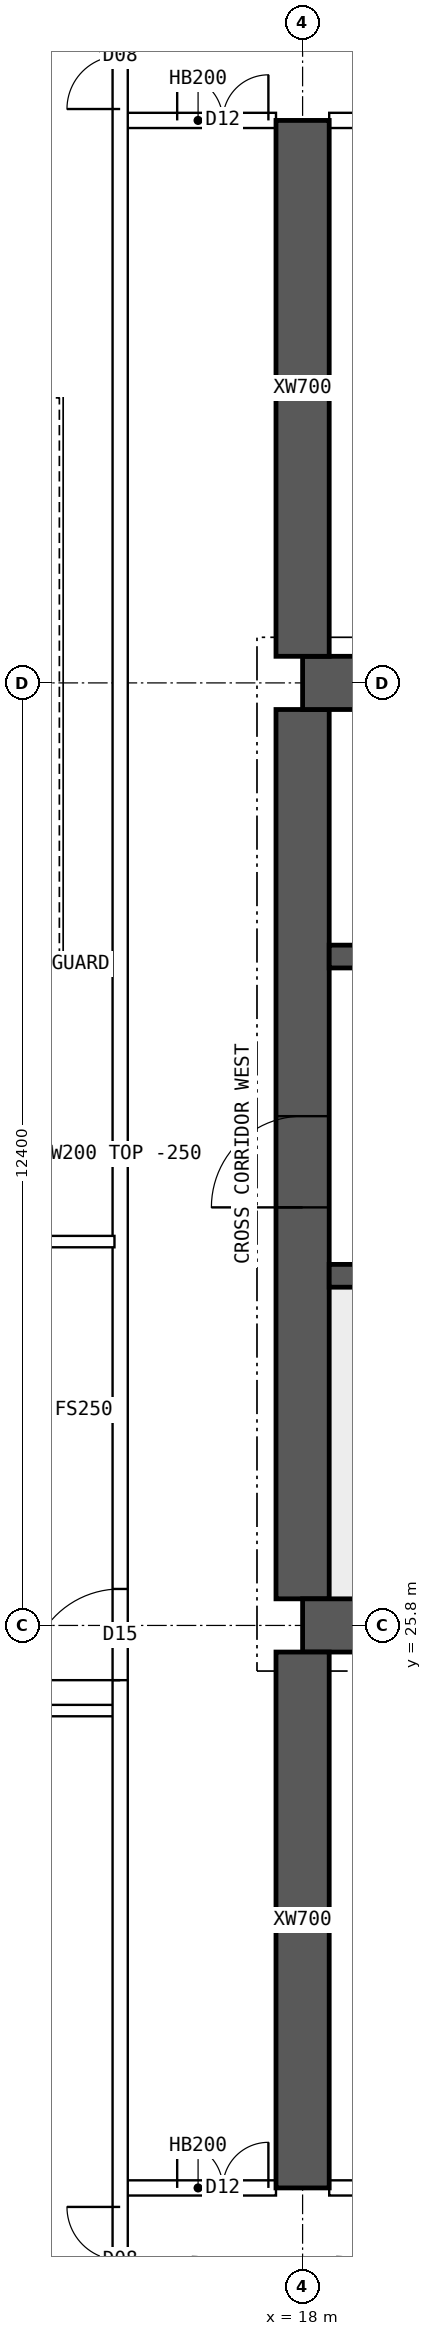
"""IFC4 building model, lengths in metres.
Left out: names, types, materials, properties, quantities, classifications, styles, units other than length and angle.
Written with IfcOpenShell. Run it as: python <this file> out.ifc"""

import sys

from ifc_helpers import new_model, si_unit, direction, frame, frame_2d, origin, place, context, subcontext, project, spatial, polyline, rectangle, outline, extrude, element, fill, save


model = new_model("IFC4")
c1 = context("Model", 3, precision=1e-05, world=origin(), true_north=direction((0.0, 1.0)))
c2 = subcontext(c1, "Body", "Model", "MODEL_VIEW")
j1 = project(units=[si_unit("LENGTHUNIT", "METRE"), si_unit("PLANEANGLEUNIT", "RADIAN")], contexts=[c1])
p1 = place(None, origin())
s1 = spatial("IfcSite", under=j1, at=p1, CompositionType="ELEMENT")
p2 = place(p1, origin())
s2 = spatial("IfcBuilding", under=s1, at=p2, CompositionType="ELEMENT")
p3 = place(p2, frame((0.0, 0.0, 220.3)))
s3 = spatial("IfcBuildingStorey", under=s2, at=p3, CompositionType="ELEMENT", Elevation=220.3)
for number, where, z_axis, x_axis in (
    (1, (18.0, 25.8, 0.0), (0.0, 0.0, 1.0), (1.0, 0.0, 0.0)),
    (2, (18.0, 38.2, 0.0), (0.0, 0.0, 1.0), (1.0, 0.0, 0.0)),
):
    element("IfcWall", number, at=place(p3, frame(where, z_axis=z_axis, x_axis=x_axis)), inside=s3, PredefinedType="SHEAR", context=c2, shape_type="SweptSolid", body=[
        extrude(rectangle(XDim=48.0, YDim=0.7, at=frame_2d((24.0, 0.0))), origin(), (0.0, 0.0, 1.0), 3.75),
    ])
p4 = place(p3, frame((18.0, 26.15, 0.0), z_axis=(0.0, 0.0, 1.0), x_axis=(0.0, 1.0, 0.0)))
e3 = element("IfcWall", 3, at=p4, inside=s3, PredefinedType="SHEAR", context=c2, shape_type="SweptSolid", body=[
    extrude(rectangle(XDim=11.7, YDim=0.7, at=frame_2d((5.85, 0.0))), origin(), (0.0, 0.0, 1.0), 3.75),
])
p5 = place(p4, frame((5.15, 0.0, 0.0)))
e4 = element("IfcOpeningElement", 4, at=p5, cuts=e3, PredefinedType="OPENING", context=c2, shape_type="SweptSolid", body=[
    extrude(rectangle(XDim=1.2, YDim=2.1, at=frame_2d((0.6, 1.05))), frame((0.0, 0.36, 0.0), z_axis=(0.0, -1.0, 0.0), x_axis=(1.0, 0.0, 0.0)), (0.0, 0.0, 1.0), 0.72),
])
p6 = place(p3, frame((18.35, 30.4, 0.0), z_axis=(0.0, 0.0, 1.0), x_axis=(1.0, 0.0, 0.0)))
e5 = element("IfcWall", 5, at=p6, inside=s3, PredefinedType="SHEAR", context=c2, shape_type="SweptSolid", body=[
    extrude(rectangle(XDim=47.3, YDim=0.3, at=frame_2d((23.65, 0.0))), origin(), (0.0, 0.0, 1.0), 3.75),
])
p7 = place(p6, frame((0.4, 0.0, 0.0)))
e6 = element("IfcOpeningElement", 6, at=p7, cuts=e5, PredefinedType="OPENING", context=c2, shape_type="SweptSolid", body=[
    extrude(rectangle(XDim=1.0, YDim=2.1, at=frame_2d((0.5, 1.05))), frame((0.0, 0.16, 0.0), z_axis=(0.0, -1.0, 0.0), x_axis=(1.0, 0.0, 0.0)), (0.0, 0.0, 1.0), 0.32),
])
p8 = place(p6, frame((45.9, 0.0, 0.0)))
e7 = element("IfcOpeningElement", 7, at=p8, cuts=e5, PredefinedType="OPENING", context=c2, shape_type="SweptSolid", body=[
    extrude(rectangle(XDim=1.0, YDim=2.1, at=frame_2d((0.5, 1.05))), frame((0.0, 0.16, 0.0), z_axis=(0.0, -1.0, 0.0), x_axis=(1.0, 0.0, 0.0)), (0.0, 0.0, 1.0), 0.32),
])
p9 = place(p6, frame((8.4, 0.0, 0.0)))
e8 = element("IfcOpeningElement", 8, at=p9, cuts=e5, PredefinedType="OPENING", context=c2, shape_type="SweptSolid", body=[
    extrude(rectangle(XDim=1.1, YDim=2.1, at=frame_2d((0.55, 1.05))), frame((0.0, 0.16, 0.0), z_axis=(0.0, -1.0, 0.0), x_axis=(1.0, 0.0, 0.0)), (0.0, 0.0, 1.0), 0.32),
])
p10 = place(p6, frame((11.0, 0.0, 0.0)))
e9 = element("IfcOpeningElement", 9, at=p10, cuts=e5, PredefinedType="OPENING", context=c2, shape_type="SweptSolid", body=[
    extrude(rectangle(XDim=1.1, YDim=2.1, at=frame_2d((0.55, 1.05))), frame((0.0, 0.16, 0.0), z_axis=(0.0, -1.0, 0.0), x_axis=(1.0, 0.0, 0.0)), (0.0, 0.0, 1.0), 0.32),
])
p11 = place(p6, frame((13.6, 0.0, 0.0)))
e10 = element("IfcOpeningElement", 10, at=p11, cuts=e5, PredefinedType="OPENING", context=c2, shape_type="SweptSolid", body=[
    extrude(rectangle(XDim=1.1, YDim=2.1, at=frame_2d((0.55, 1.05))), frame((0.0, 0.16, 0.0), z_axis=(0.0, -1.0, 0.0), x_axis=(1.0, 0.0, 0.0)), (0.0, 0.0, 1.0), 0.32),
])
p12 = place(p6, frame((16.2, 0.0, 0.0)))
e11 = element("IfcOpeningElement", 11, at=p12, cuts=e5, PredefinedType="OPENING", context=c2, shape_type="SweptSolid", body=[
    extrude(rectangle(XDim=1.1, YDim=2.1, at=frame_2d((0.55, 1.05))), frame((0.0, 0.16, 0.0), z_axis=(0.0, -1.0, 0.0), x_axis=(1.0, 0.0, 0.0)), (0.0, 0.0, 1.0), 0.32),
])
p13 = place(p6, frame((18.975, 0.0, 0.0)))
e12 = element("IfcOpeningElement", 12, at=p13, cuts=e5, PredefinedType="OPENING", context=c2, shape_type="SweptSolid", body=[
    extrude(rectangle(XDim=0.9, YDim=2.1, at=frame_2d((0.45, 1.05))), frame((0.0, 0.16, 0.0), z_axis=(0.0, -1.0, 0.0), x_axis=(1.0, 0.0, 0.0)), (0.0, 0.0, 1.0), 0.32),
])
p14 = place(p6, frame((24.475, 0.0, 0.0)))
e13 = element("IfcOpeningElement", 13, at=p14, cuts=e5, PredefinedType="OPENING", context=c2, shape_type="SweptSolid", body=[
    extrude(rectangle(XDim=0.9, YDim=2.1, at=frame_2d((0.45, 1.05))), frame((0.0, 0.16, 0.0), z_axis=(0.0, -1.0, 0.0), x_axis=(1.0, 0.0, 0.0)), (0.0, 0.0, 1.0), 0.32),
])
p15 = place(p6, frame((30.267, 0.0, 0.0)))
e14 = element("IfcOpeningElement", 14, at=p15, cuts=e5, PredefinedType="OPENING", context=c2, shape_type="SweptSolid", body=[
    extrude(rectangle(XDim=1.1, YDim=2.1, at=frame_2d((0.55, 1.05))), frame((0.0, 0.16, 0.0), z_axis=(0.0, -1.0, 0.0), x_axis=(1.0, 0.0, 0.0)), (0.0, 0.0, 1.0), 0.32),
])
p16 = place(p6, frame((33.8, 0.0, 0.0)))
e15 = element("IfcOpeningElement", 15, at=p16, cuts=e5, PredefinedType="OPENING", context=c2, shape_type="SweptSolid", body=[
    extrude(rectangle(XDim=1.1, YDim=2.1, at=frame_2d((0.55, 1.05))), frame((0.0, 0.16, 0.0), z_axis=(0.0, -1.0, 0.0), x_axis=(1.0, 0.0, 0.0)), (0.0, 0.0, 1.0), 0.32),
])
p17 = place(p6, frame((37.333, 0.0, 0.0)))
e16 = element("IfcOpeningElement", 16, at=p17, cuts=e5, PredefinedType="OPENING", context=c2, shape_type="SweptSolid", body=[
    extrude(rectangle(XDim=1.1, YDim=2.1, at=frame_2d((0.55, 1.05))), frame((0.0, 0.16, 0.0), z_axis=(0.0, -1.0, 0.0), x_axis=(1.0, 0.0, 0.0)), (0.0, 0.0, 1.0), 0.32),
])
p18 = place(p3, frame((18.35, 34.6, 0.0), z_axis=(0.0, 0.0, 1.0), x_axis=(1.0, 0.0, 0.0)))
e17 = element("IfcWall", 17, at=p18, inside=s3, PredefinedType="SHEAR", context=c2, shape_type="SweptSolid", body=[
    extrude(rectangle(XDim=47.3, YDim=0.3, at=frame_2d((23.65, 0.0))), origin(), (0.0, 0.0, 1.0), 3.75),
])
p19 = place(p18, frame((0.9, 0.0, 0.0)))
e18 = element("IfcOpeningElement", 18, at=p19, cuts=e17, PredefinedType="OPENING", context=c2, shape_type="SweptSolid", body=[
    extrude(rectangle(XDim=1.1, YDim=2.1, at=frame_2d((0.55, 1.05))), frame((0.0, 0.16, 0.0), z_axis=(0.0, -1.0, 0.0), x_axis=(1.0, 0.0, 0.0)), (0.0, 0.0, 1.0), 0.32),
])
p20 = place(p18, frame((45.3, 0.0, 0.0)))
e19 = element("IfcOpeningElement", 19, at=p20, cuts=e17, PredefinedType="OPENING", context=c2, shape_type="SweptSolid", body=[
    extrude(rectangle(XDim=1.1, YDim=2.1, at=frame_2d((0.55, 1.05))), frame((0.0, 0.16, 0.0), z_axis=(0.0, -1.0, 0.0), x_axis=(1.0, 0.0, 0.0)), (0.0, 0.0, 1.0), 0.32),
])
p21 = place(p18, frame((4.25, 0.0, 0.0)))
e20 = element("IfcOpeningElement", 20, at=p21, cuts=e17, PredefinedType="OPENING", context=c2, shape_type="SweptSolid", body=[
    extrude(rectangle(XDim=0.9, YDim=2.1, at=frame_2d((0.45, 1.05))), frame((0.0, 0.16, 0.0), z_axis=(0.0, -1.0, 0.0), x_axis=(1.0, 0.0, 0.0)), (0.0, 0.0, 1.0), 0.32),
])
p22 = place(p18, frame((42.15, 0.0, 0.0)))
e21 = element("IfcOpeningElement", 21, at=p22, cuts=e17, PredefinedType="OPENING", context=c2, shape_type="SweptSolid", body=[
    extrude(rectangle(XDim=0.9, YDim=2.1, at=frame_2d((0.45, 1.05))), frame((0.0, 0.16, 0.0), z_axis=(0.0, -1.0, 0.0), x_axis=(1.0, 0.0, 0.0)), (0.0, 0.0, 1.0), 0.32),
])
p23 = place(p18, frame((9.025, 0.0, 0.0)))
e22 = element("IfcOpeningElement", 22, at=p23, cuts=e17, PredefinedType="OPENING", context=c2, shape_type="SweptSolid", body=[
    extrude(rectangle(XDim=0.9, YDim=2.1, at=frame_2d((0.45, 1.05))), frame((0.0, 0.16, 0.0), z_axis=(0.0, -1.0, 0.0), x_axis=(1.0, 0.0, 0.0)), (0.0, 0.0, 1.0), 0.32),
])
p24 = place(p18, frame((12.999, 0.0, 0.0)))
e23 = element("IfcOpeningElement", 23, at=p24, cuts=e17, PredefinedType="OPENING", context=c2, shape_type="SweptSolid", body=[
    extrude(rectangle(XDim=0.9, YDim=2.1, at=frame_2d((0.45, 1.05))), frame((0.0, 0.16, 0.0), z_axis=(0.0, -1.0, 0.0), x_axis=(1.0, 0.0, 0.0)), (0.0, 0.0, 1.0), 0.32),
])
p25 = place(p18, frame((16.646, 0.0, 0.0)))
e24 = element("IfcOpeningElement", 24, at=p25, cuts=e17, PredefinedType="OPENING", context=c2, shape_type="SweptSolid", body=[
    extrude(rectangle(XDim=0.9, YDim=2.1, at=frame_2d((0.45, 1.05))), frame((0.0, 0.16, 0.0), z_axis=(0.0, -1.0, 0.0), x_axis=(1.0, 0.0, 0.0)), (0.0, 0.0, 1.0), 0.32),
])
p26 = place(p18, frame((20.405, 0.0, 0.0)))
e25 = element("IfcOpeningElement", 25, at=p26, cuts=e17, PredefinedType="OPENING", context=c2, shape_type="SweptSolid", body=[
    extrude(rectangle(XDim=0.9, YDim=2.1, at=frame_2d((0.45, 1.05))), frame((0.0, 0.16, 0.0), z_axis=(0.0, -1.0, 0.0), x_axis=(1.0, 0.0, 0.0)), (0.0, 0.0, 1.0), 0.32),
])
p27 = place(p18, frame((24.811, 0.0, 0.0)))
e26 = element("IfcOpeningElement", 26, at=p27, cuts=e17, PredefinedType="OPENING", context=c2, shape_type="SweptSolid", body=[
    extrude(rectangle(XDim=0.9, YDim=2.1, at=frame_2d((0.45, 1.05))), frame((0.0, 0.16, 0.0), z_axis=(0.0, -1.0, 0.0), x_axis=(1.0, 0.0, 0.0)), (0.0, 0.0, 1.0), 0.32),
])
p28 = place(p18, frame((27.608, 0.0, 0.0)))
e27 = element("IfcOpeningElement", 27, at=p28, cuts=e17, PredefinedType="OPENING", context=c2, shape_type="SweptSolid", body=[
    extrude(rectangle(XDim=0.9, YDim=2.1, at=frame_2d((0.45, 1.05))), frame((0.0, 0.16, 0.0), z_axis=(0.0, -1.0, 0.0), x_axis=(1.0, 0.0, 0.0)), (0.0, 0.0, 1.0), 0.32),
])
p29 = place(p18, frame((29.575, 0.0, 0.0)))
e28 = element("IfcOpeningElement", 28, at=p29, cuts=e17, PredefinedType="OPENING", context=c2, shape_type="SweptSolid", body=[
    extrude(rectangle(XDim=0.9, YDim=2.1, at=frame_2d((0.45, 1.05))), frame((0.0, 0.16, 0.0), z_axis=(0.0, -1.0, 0.0), x_axis=(1.0, 0.0, 0.0)), (0.0, 0.0, 1.0), 0.32),
])
p30 = place(p18, frame((32.007, 0.0, 0.0)))
e29 = element("IfcOpeningElement", 29, at=p30, cuts=e17, PredefinedType="OPENING", context=c2, shape_type="SweptSolid", body=[
    extrude(rectangle(XDim=0.9, YDim=2.1, at=frame_2d((0.45, 1.05))), frame((0.0, 0.16, 0.0), z_axis=(0.0, -1.0, 0.0), x_axis=(1.0, 0.0, 0.0)), (0.0, 0.0, 1.0), 0.32),
])
p31 = place(p18, frame((34.742, 0.0, 0.0)))
e30 = element("IfcOpeningElement", 30, at=p31, cuts=e17, PredefinedType="OPENING", context=c2, shape_type="SweptSolid", body=[
    extrude(rectangle(XDim=0.9, YDim=2.1, at=frame_2d((0.45, 1.05))), frame((0.0, 0.16, 0.0), z_axis=(0.0, -1.0, 0.0), x_axis=(1.0, 0.0, 0.0)), (0.0, 0.0, 1.0), 0.32),
])
p32 = place(p18, frame((37.781, 0.0, 0.0)))
e31 = element("IfcOpeningElement", 31, at=p32, cuts=e17, PredefinedType="OPENING", context=c2, shape_type="SweptSolid", body=[
    extrude(rectangle(XDim=0.9, YDim=2.1, at=frame_2d((0.45, 1.05))), frame((0.0, 0.16, 0.0), z_axis=(0.0, -1.0, 0.0), x_axis=(1.0, 0.0, 0.0)), (0.0, 0.0, 1.0), 0.32),
])
for number, where, z_axis, x_axis in (
    (32, (18.0, 18.4, 0.0), (0.0, 0.0, 1.0), (0.0, 1.0, 0.0)),
    (33, (18.0, 38.55, 0.0), (0.0, 0.0, 1.0), (0.0, 1.0, 0.0)),
):
    element("IfcWall", number, at=place(p3, frame(where, z_axis=z_axis, x_axis=x_axis)), inside=s3, PredefinedType="SHEAR", context=c2, shape_type="SweptSolid", body=[
        extrude(rectangle(XDim=7.05, YDim=0.7, at=frame_2d((3.525, 0.0))), origin(), (0.0, 0.0, 1.0), 3.75),
    ])
p33 = place(p3, frame((15.6, 18.4, 0.0), z_axis=(0.0, 0.0, 1.0), x_axis=(1.0, 0.0, 0.0)))
e34 = element("IfcWall", 34, at=p33, inside=s3, PredefinedType="SOLIDWALL", context=c2, shape_type="SweptSolid", body=[
    extrude(rectangle(XDim=2.05, YDim=0.2, at=frame_2d((1.025, 0.0))), origin(), (0.0, 0.0, 1.0), 3.5),
])
p34 = place(p33, frame((0.75, 0.0, 0.0)))
e35 = element("IfcOpeningElement", 35, at=p34, cuts=e34, PredefinedType="OPENING", context=c2, shape_type="SweptSolid", body=[
    extrude(rectangle(XDim=1.2, YDim=2.1, at=frame_2d((0.6, 1.05))), frame((0.0, 0.11, 0.0), z_axis=(0.0, -1.0, 0.0), x_axis=(1.0, 0.0, 0.0)), (0.0, 0.0, 1.0), 0.22),
])
p35 = place(p3, frame((18.35, 18.4, 0.0), z_axis=(0.0, 0.0, 1.0), x_axis=(1.0, 0.0, 0.0)))
e36 = element("IfcWall", 36, at=p35, inside=s3, PredefinedType="SOLIDWALL", context=c2, shape_type="SweptSolid", body=[
    extrude(rectangle(XDim=5.3, YDim=0.2, at=frame_2d((2.65, 0.0))), origin(), (0.0, 0.0, 1.0), 3.5),
])
p36 = place(p35, frame((0.35, 0.0, 0.0)))
e37 = element("IfcOpeningElement", 37, at=p36, cuts=e36, PredefinedType="OPENING", context=c2, shape_type="SweptSolid", body=[
    extrude(rectangle(XDim=0.9, YDim=2.1, at=frame_2d((0.45, 1.05))), frame((0.0, 0.11, 0.0), z_axis=(0.0, -1.0, 0.0), x_axis=(1.0, 0.0, 0.0)), (0.0, 0.0, 1.0), 0.22),
])
p37 = place(p35, frame((3.165, 0.0, 0.0)))
e38 = element("IfcOpeningElement", 38, at=p37, cuts=e36, PredefinedType="OPENING", context=c2, shape_type="SweptSolid", body=[
    extrude(rectangle(XDim=0.9, YDim=2.1, at=frame_2d((0.45, 1.05))), frame((0.0, 0.11, 0.0), z_axis=(0.0, -1.0, 0.0), x_axis=(1.0, 0.0, 0.0)), (0.0, 0.0, 1.0), 0.22),
])
p38 = place(p3, frame((15.6, 45.6, 0.0), z_axis=(0.0, 0.0, 1.0), x_axis=(1.0, 0.0, 0.0)))
e39 = element("IfcWall", 39, at=p38, inside=s3, PredefinedType="SOLIDWALL", context=c2, shape_type="SweptSolid", body=[
    extrude(rectangle(XDim=2.05, YDim=0.2, at=frame_2d((1.025, 0.0))), origin(), (0.0, 0.0, 1.0), 3.5),
])
p39 = place(p38, frame((0.75, 0.0, 0.0)))
e40 = element("IfcOpeningElement", 40, at=p39, cuts=e39, PredefinedType="OPENING", context=c2, shape_type="SweptSolid", body=[
    extrude(rectangle(XDim=1.2, YDim=2.1, at=frame_2d((0.6, 1.05))), frame((0.0, 0.11, 0.0), z_axis=(0.0, -1.0, 0.0), x_axis=(1.0, 0.0, 0.0)), (0.0, 0.0, 1.0), 0.22),
])
p40 = place(p3, frame((18.35, 45.6, 0.0), z_axis=(0.0, 0.0, 1.0), x_axis=(1.0, 0.0, 0.0)))
e41 = element("IfcWall", 41, at=p40, inside=s3, PredefinedType="SOLIDWALL", context=c2, shape_type="SweptSolid", body=[
    extrude(rectangle(XDim=5.3, YDim=0.2, at=frame_2d((2.65, 0.0))), origin(), (0.0, 0.0, 1.0), 3.5),
])
p41 = place(p40, frame((0.8, 0.0, 0.0)))
e42 = element("IfcOpeningElement", 42, at=p41, cuts=e41, PredefinedType="OPENING", context=c2, shape_type="SweptSolid", body=[
    extrude(rectangle(XDim=1.0, YDim=2.1, at=frame_2d((0.5, 1.05))), frame((0.0, 0.11, 0.0), z_axis=(0.0, -1.0, 0.0), x_axis=(1.0, 0.0, 0.0)), (0.0, 0.0, 1.0), 0.22),
])
p42 = place(p3, frame((8.705, 30.85, 0.0), z_axis=(0.0, 0.0, 1.0), x_axis=(1.0, 0.0, 0.0)))
e43 = element("IfcWall", 43, at=p42, inside=s3, PredefinedType="PARTITIONING", context=c2, shape_type="SweptSolid", body=[
    extrude(outline(polyline([(0.0, 0.0), (6.82, 0.0), (6.82, 3.5), (3.597, 3.5), (3.595, 3.05), (2.997, 3.05), (2.995, 3.5), (0.0, 3.5), (0.0, 0.0)])), frame((0.0, 0.075, 0.0), z_axis=(0.0, -1.0, 0.0), x_axis=(1.0, 0.0, 0.0)), (0.0, 0.0, 1.0), 0.15),
])
p43 = place(p3, frame((15.6, 11.646, 0.0), z_axis=(0.0, 0.0, 1.0), x_axis=(0.0, 1.0, 0.0)))
e44 = element("IfcWall", 44, at=p43, inside=s3, PredefinedType="SOLIDWALL", context=c2, shape_type="SweptSolid", body=[
    extrude(rectangle(XDim=40.708, YDim=0.2, at=frame_2d((20.354, 0.0))), origin(), (0.0, 0.0, 1.0), 3.5),
])
p44 = place(p43, frame((13.434, 0.0, 0.0)))
e45 = element("IfcOpeningElement", 45, at=p44, cuts=e44, PredefinedType="OPENING", context=c2, shape_type="SweptSolid", body=[
    extrude(rectangle(XDim=1.2, YDim=2.1, at=frame_2d((0.6, 1.05))), frame((0.0, 0.11, 0.0), z_axis=(0.0, -1.0, 0.0), x_axis=(1.0, 0.0, 0.0)), (0.0, 0.0, 1.0), 0.22),
])
p45 = place(p43, frame((5.104, 0.0, 0.0)))
e46 = element("IfcOpeningElement", 46, at=p45, cuts=e44, PredefinedType="OPENING", context=c2, shape_type="SweptSolid", body=[
    extrude(rectangle(XDim=1.4, YDim=2.1, at=frame_2d((0.7, 1.05))), frame((0.0, 0.11, 0.0), z_axis=(0.0, -1.0, 0.0), x_axis=(1.0, 0.0, 0.0)), (0.0, 0.0, 1.0), 0.22),
])
p46 = place(p43, frame((34.104, 0.0, 0.0)))
e47 = element("IfcOpeningElement", 47, at=p46, cuts=e44, PredefinedType="OPENING", context=c2, shape_type="SweptSolid", body=[
    extrude(rectangle(XDim=1.4, YDim=2.1, at=frame_2d((0.7, 1.05))), frame((0.0, 0.11, 0.0), z_axis=(0.0, -1.0, 0.0), x_axis=(1.0, 0.0, 0.0)), (0.0, 0.0, 1.0), 0.22),
])
p47 = place(p3, frame((8.705, 24.68, 0.0), z_axis=(0.0, 0.0, 1.0), x_axis=(1.0, 0.0, 0.0)))
e48 = element("IfcWall", 48, at=p47, inside=s3, PredefinedType="PARTITIONING", context=c2, shape_type="SweptSolid", body=[
    extrude(rectangle(XDim=6.82, YDim=0.15, at=frame_2d((3.41, 0.0))), origin(), (0.0, 0.0, 1.0), 3.5),
])
p48 = place(p5, origin())
e49 = element("IfcDoor", 49, at=p48, inside=s3, OperationType="SINGLE_SWING_LEFT", PredefinedType="DOOR", context=c2, shape_type="SweptSolid", body=[
    extrude(rectangle(XDim=1.2, YDim=2.1, at=frame_2d((0.6, 1.05))), frame((0.0, 0.025, 0.0), z_axis=(0.0, -1.0, 0.0), x_axis=(1.0, 0.0, 0.0)), (0.0, 0.0, 1.0), 0.05),
])
fill(e4, e49)
p49 = place(p34, origin())
e50 = element("IfcDoor", 50, at=p49, inside=s3, OperationType="DOUBLE_DOOR_SINGLE_SWING", PredefinedType="DOOR", context=c2, shape_type="SweptSolid", body=[
    extrude(rectangle(XDim=1.2, YDim=2.1, at=frame_2d((0.6, 1.05))), frame((0.0, 0.025, 0.0), z_axis=(0.0, -1.0, 0.0), x_axis=(1.0, 0.0, 0.0)), (0.0, 0.0, 1.0), 0.05),
])
fill(e35, e50)
p50 = place(p39, origin())
e51 = element("IfcDoor", 51, at=p50, inside=s3, OperationType="DOUBLE_DOOR_SINGLE_SWING", PredefinedType="DOOR", context=c2, shape_type="SweptSolid", body=[
    extrude(rectangle(XDim=1.2, YDim=2.1, at=frame_2d((0.6, 1.05))), frame((0.0, 0.025, 0.0), z_axis=(0.0, -1.0, 0.0), x_axis=(1.0, 0.0, 0.0)), (0.0, 0.0, 1.0), 0.05),
])
fill(e40, e51)
p51 = place(p44, origin())
e52 = element("IfcDoor", 52, at=p51, inside=s3, OperationType="SINGLE_SWING_LEFT", PredefinedType="DOOR", context=c2, shape_type="SweptSolid", body=[
    extrude(rectangle(XDim=1.2, YDim=2.1, at=frame_2d((0.6, 1.05))), frame((0.0, 0.025, 0.0), z_axis=(0.0, -1.0, 0.0), x_axis=(1.0, 0.0, 0.0)), (0.0, 0.0, 1.0), 0.05),
])
fill(e45, e52)
p52 = place(p45, origin())
e53 = element("IfcDoor", 53, at=p52, inside=s3, OperationType="DOUBLE_DOOR_SINGLE_SWING", PredefinedType="DOOR", context=c2, shape_type="SweptSolid", body=[
    extrude(rectangle(XDim=1.4, YDim=2.1, at=frame_2d((0.7, 1.05))), frame((0.0, 0.025, 0.0), z_axis=(0.0, -1.0, 0.0), x_axis=(1.0, 0.0, 0.0)), (0.0, 0.0, 1.0), 0.05),
])
fill(e46, e53)
p53 = place(p46, origin())
e54 = element("IfcDoor", 54, at=p53, inside=s3, OperationType="DOUBLE_DOOR_SINGLE_SWING", PredefinedType="DOOR", context=c2, shape_type="SweptSolid", body=[
    extrude(rectangle(XDim=1.4, YDim=2.1, at=frame_2d((0.7, 1.05))), frame((0.0, 0.025, 0.0), z_axis=(0.0, -1.0, 0.0), x_axis=(1.0, 0.0, 0.0)), (0.0, 0.0, 1.0), 0.05),
])
fill(e47, e54)
save(model, sys.argv[1])
